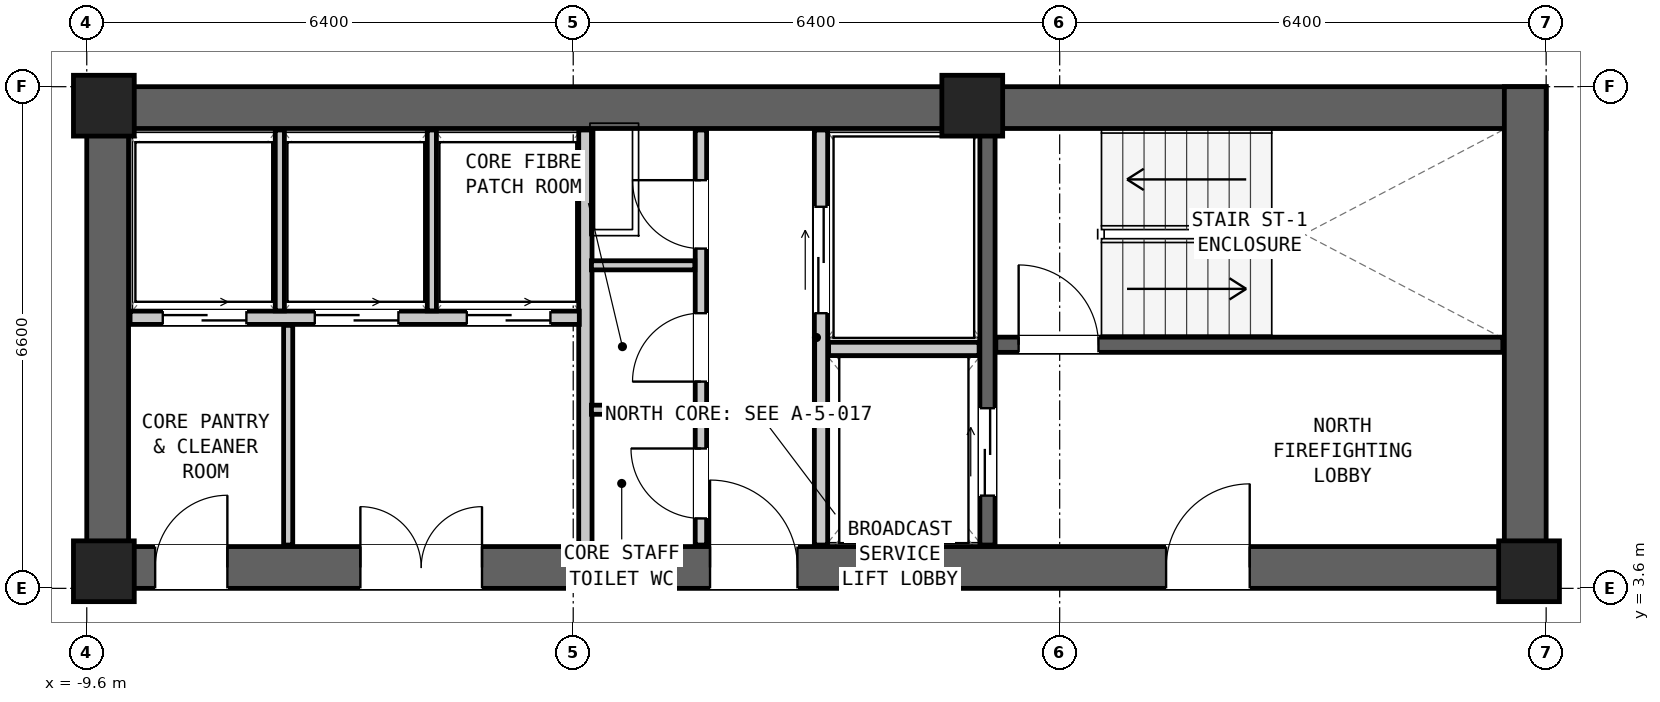
"""IFC4 building model, lengths in metres.
Left out: names, types, materials, properties, quantities, classifications, styles, units other than length and angle.
Written with IfcOpenShell. Run it as: python <this file> out.ifc"""

import sys

from ifc_helpers import new_model, si_unit, direction, frame, frame_2d, origin, origin_2d, place, context, subcontext, project, spatial, rectangle, extrude, element, fill, save


model = new_model("IFC4")
c1 = context("Model", 3, precision=1e-05, world=origin(), true_north=direction((0.0, 1.0)))
c2 = subcontext(c1, "Body", "Model", "MODEL_VIEW")
j1 = project(units=[si_unit("LENGTHUNIT", "METRE"), si_unit("PLANEANGLEUNIT", "RADIAN")], contexts=[c1])
p1 = place(None, origin())
s1 = spatial("IfcSite", under=j1, at=p1, CompositionType="ELEMENT")
p2 = place(p1, origin())
s2 = spatial("IfcBuilding", under=s1, at=p2, CompositionType="ELEMENT")
p3 = place(p2, frame((0.0, 0.0, 50.5)))
s3 = spatial("IfcBuildingStorey", under=s2, at=p3, CompositionType="ELEMENT", Elevation=50.5)
p4 = place(p3, frame((-9.6, 9.925, 0.0), z_axis=(0.0, 0.0, 1.0), x_axis=(1.0, 0.0, 0.0)))
e1 = element("IfcWall", 1, at=p4, inside=s3, PredefinedType="SHEAR", context=c2, shape_type="SweptSolid", body=[
    extrude(rectangle(XDim=19.2, YDim=0.55, at=frame_2d((9.6, 0.0))), origin(), (0.0, 0.0, 1.0), 3.05),
])
p5 = place(p3, frame((-9.6, 3.875, 0.0), z_axis=(0.0, 0.0, 1.0), x_axis=(1.0, 0.0, 0.0)))
e2 = element("IfcWall", 2, at=p5, inside=s3, PredefinedType="SHEAR", context=c2, shape_type="SweptSolid", body=[
    extrude(rectangle(XDim=19.2, YDim=0.55, at=frame_2d((9.6, 0.0))), origin(), (0.0, 0.0, 1.0), 3.05),
])
p6 = place(p5, frame((14.2, 0.0, 0.0)))
e3 = element("IfcOpeningElement", 3, at=p6, cuts=e2, PredefinedType="OPENING", context=c2, shape_type="SweptSolid", body=[
    extrude(rectangle(XDim=1.1, YDim=2.08, at=frame_2d((0.55, 1.04))), frame((0.0, 0.287, 0.0), z_axis=(0.0, -1.0, 0.0), x_axis=(1.0, 0.0, 0.0)), (0.0, 0.0, 1.0), 0.574),
])
p7 = place(p5, frame((8.2, 0.0, 0.0)))
e4 = element("IfcOpeningElement", 4, at=p7, cuts=e2, PredefinedType="OPENING", context=c2, shape_type="SweptSolid", body=[
    extrude(rectangle(XDim=1.15, YDim=2.1, at=frame_2d((0.575, 1.05))), frame((0.0, 0.287, 0.0), z_axis=(0.0, -1.0, 0.0), x_axis=(1.0, 0.0, 0.0)), (0.0, 0.0, 1.0), 0.574),
])
p8 = place(p5, frame((0.9, 0.0, 0.0)))
e5 = element("IfcOpeningElement", 5, at=p8, cuts=e2, PredefinedType="OPENING", context=c2, shape_type="SweptSolid", body=[
    extrude(rectangle(XDim=0.95, YDim=2.1, at=frame_2d((0.475, 1.05))), frame((0.0, 0.287, 0.0), z_axis=(0.0, -1.0, 0.0), x_axis=(1.0, 0.0, 0.0)), (0.0, 0.0, 1.0), 0.574),
])
p9 = place(p5, frame((3.6, 0.0, 0.0)))
e6 = element("IfcOpeningElement", 6, at=p9, cuts=e2, PredefinedType="OPENING", context=c2, shape_type="SweptSolid", body=[
    extrude(rectangle(XDim=1.6, YDim=2.12, at=frame_2d((0.8, 1.06))), frame((0.0, 0.287, 0.0), z_axis=(0.0, -1.0, 0.0), x_axis=(1.0, 0.0, 0.0)), (0.0, 0.0, 1.0), 0.574),
])
for number, where, z_axis, x_axis in (
    (7, (-9.325, 3.6, 0.0), (0.0, 0.0, 1.0), (0.0, 1.0, 0.0)),
    (8, (9.325, 3.6, 0.0), (0.0, 0.0, 1.0), (0.0, 1.0, 0.0)),
):
    element("IfcWall", number, at=place(p3, frame(where, z_axis=z_axis, x_axis=x_axis)), inside=s3, PredefinedType="SHEAR", context=c2, shape_type="SweptSolid", body=[
        extrude(rectangle(XDim=6.6, YDim=0.55, at=frame_2d((3.3, 0.0))), origin(), (0.0, 0.0, 1.0), 3.05),
    ])
for number, where, z_axis, x_axis in (
    (9, (-9.375, 9.95, 0.0), (0.0, 0.0, 1.0), (1.0, 0.0, 0.0)),
    (10, (2.05, 9.95, 0.0), (0.0, 0.0, 1.0), (1.0, 0.0, 0.0)),
    (11, (-9.375, 3.825, 0.0), (0.0, 0.0, 1.0), (1.0, 0.0, 0.0)),
    (12, (9.375, 3.825, 0.0), (0.0, 0.0, 1.0), (1.0, 0.0, 0.0)),
):
    element("IfcColumn", number, at=place(p3, frame(where, z_axis=z_axis, x_axis=x_axis)), inside=s3, PredefinedType="COLUMN", context=c2, shape_type="SweptSolid", body=[
        extrude(rectangle(XDim=0.8, YDim=0.8, at=origin_2d()), origin(), (0.0, 0.0, 1.0), 3.05),
    ])
p10 = place(p3, frame((2.36, 6.805, 0.0), z_axis=(0.0, 0.0, 1.0), x_axis=(1.0, 0.0, 0.0)))
e13 = element("IfcWall", 13, at=p10, inside=s3, PredefinedType="SHEAR", context=c2, shape_type="SweptSolid", body=[
    extrude(rectangle(XDim=6.67, YDim=0.2, at=frame_2d((3.335, 0.0))), origin(), (0.0, 0.0, 1.0), 2.83),
])
p11 = place(p10, frame((0.3, 0.0, 0.0)))
e14 = element("IfcOpeningElement", 14, at=p11, cuts=e13, PredefinedType="OPENING", context=c2, shape_type="SweptSolid", body=[
    extrude(rectangle(XDim=1.05, YDim=2.08, at=frame_2d((0.525, 1.04))), frame((0.0, 0.112, 0.0), z_axis=(0.0, -1.0, 0.0), x_axis=(1.0, 0.0, 0.0)), (0.0, 0.0, 1.0), 0.224),
])
p12 = place(p3, frame((2.25, 4.17, 0.0), z_axis=(0.0, 0.0, 1.0), x_axis=(0.0, 1.0, 0.0)))
e15 = element("IfcWall", 15, at=p12, inside=s3, PredefinedType="SHEAR", context=c2, shape_type="SweptSolid", body=[
    extrude(rectangle(XDim=5.46, YDim=0.2, at=frame_2d((2.73, 0.0))), origin(), (0.0, 0.0, 1.0), 2.83),
])
p13 = place(p12, frame((0.65, 0.0, 0.0)))
e16 = element("IfcOpeningElement", 16, at=p13, cuts=e15, PredefinedType="OPENING", context=c2, shape_type="SweptSolid", body=[
    extrude(rectangle(XDim=1.15, YDim=2.08, at=frame_2d((0.575, 1.04))), frame((0.0, 0.112, 0.0), z_axis=(0.0, -1.0, 0.0), x_axis=(1.0, 0.0, 0.0)), (0.0, 0.0, 1.0), 0.224),
])
p14 = place(p3, frame((0.06, 4.17, 0.0), z_axis=(0.0, 0.0, 1.0), x_axis=(0.0, 1.0, 0.0)))
e17 = element("IfcWall", 17, at=p14, inside=s3, PredefinedType="PARTITIONING", context=c2, shape_type="SweptSolid", body=[
    extrude(rectangle(XDim=5.46, YDim=0.175, at=frame_2d((2.73, 0.0))), origin(), (0.0, 0.0, 1.0), 2.83),
])
p15 = place(p14, frame((3.05, 0.0, 0.0)))
e18 = element("IfcOpeningElement", 18, at=p15, cuts=e17, PredefinedType="OPENING", context=c2, shape_type="SweptSolid", body=[
    extrude(rectangle(XDim=1.4, YDim=2.12, at=frame_2d((0.7, 1.06))), frame((0.0, 0.1, 0.0), z_axis=(0.0, -1.0, 0.0), x_axis=(1.0, 0.0, 0.0)), (0.0, 0.0, 1.0), 0.199),
])
p16 = place(p3, frame((0.16, 6.75, 0.0), z_axis=(0.0, 0.0, 1.0), x_axis=(1.0, 0.0, 0.0)))
e19 = element("IfcWall", 19, at=p16, inside=s3, PredefinedType="PARTITIONING", context=c2, shape_type="SweptSolid", body=[
    extrude(rectangle(XDim=1.98, YDim=0.175, at=frame_2d((0.99, 0.0))), origin(), (0.0, 0.0, 1.0), 2.83),
])
p17 = place(p3, frame((-3.04, 4.17, 0.0), z_axis=(0.0, 0.0, 1.0), x_axis=(0.0, 1.0, 0.0)))
e20 = element("IfcWall", 20, at=p17, inside=s3, PredefinedType="PARTITIONING", context=c2, shape_type="SweptSolid", body=[
    extrude(rectangle(XDim=5.46, YDim=0.175, at=frame_2d((2.73, 0.0))), origin(), (0.0, 0.0, 1.0), 2.83),
])
p18 = place(p3, frame((-1.52, 4.17, 0.0), z_axis=(0.0, 0.0, 1.0), x_axis=(0.0, 1.0, 0.0)))
e21 = element("IfcWall", 21, at=p18, inside=s3, PredefinedType="PARTITIONING", context=c2, shape_type="SweptSolid", body=[
    extrude(rectangle(XDim=5.46, YDim=0.15, at=frame_2d((2.73, 0.0))), origin(), (0.0, 0.0, 1.0), 2.83),
])
p19 = place(p18, frame((3.9, 0.0, 0.0)))
e22 = element("IfcOpeningElement", 22, at=p19, cuts=e21, PredefinedType="OPENING", context=c2, shape_type="SweptSolid", body=[
    extrude(rectangle(XDim=0.9, YDim=2.05, at=frame_2d((0.45, 1.025))), frame((0.0, 0.087, 0.0), z_axis=(0.0, -1.0, 0.0), x_axis=(1.0, 0.0, 0.0)), (0.0, 0.0, 1.0), 0.174),
])
p20 = place(p18, frame((2.15, 0.0, 0.0)))
e23 = element("IfcOpeningElement", 23, at=p20, cuts=e21, PredefinedType="OPENING", context=c2, shape_type="SweptSolid", body=[
    extrude(rectangle(XDim=0.9, YDim=2.05, at=frame_2d((0.45, 1.025))), frame((0.0, 0.087, 0.0), z_axis=(0.0, -1.0, 0.0), x_axis=(1.0, 0.0, 0.0)), (0.0, 0.0, 1.0), 0.174),
])
p21 = place(p18, frame((0.35, 0.0, 0.0)))
e24 = element("IfcOpeningElement", 24, at=p21, cuts=e21, PredefinedType="OPENING", context=c2, shape_type="SweptSolid", body=[
    extrude(rectangle(XDim=0.92, YDim=2.1, at=frame_2d((0.46, 1.05))), frame((0.0, 0.087, 0.0), z_axis=(0.0, -1.0, 0.0), x_axis=(1.0, 0.0, 0.0)), (0.0, 0.0, 1.0), 0.174),
])
for number, where, z_axis, x_axis in (
    (25, (-2.96, 5.95, 0.0), (0.0, 0.0, 1.0), (1.0, 0.0, 0.0)),
    (26, (-2.96, 7.85, 0.0), (0.0, 0.0, 1.0), (1.0, 0.0, 0.0)),
):
    element("IfcWall", number, at=place(p3, frame(where, z_axis=z_axis, x_axis=x_axis)), inside=s3, PredefinedType="PARTITIONING", context=c2, shape_type="SweptSolid", body=[
        extrude(rectangle(XDim=1.36, YDim=0.12, at=frame_2d((0.68, 0.0))), origin(), (0.0, 0.0, 1.0), 2.83),
    ])
p22 = place(p3, frame((-9.03, 7.16, 0.0), z_axis=(0.0, 0.0, 1.0), x_axis=(1.0, 0.0, 0.0)))
e27 = element("IfcWall", 27, at=p22, inside=s3, PredefinedType="PARTITIONING", context=c2, shape_type="SweptSolid", body=[
    extrude(rectangle(XDim=5.91, YDim=0.175, at=frame_2d((2.955, 0.0))), origin(), (0.0, 0.0, 1.0), 2.83),
])
p23 = place(p22, frame((0.43, 0.0, 0.0)))
e28 = element("IfcOpeningElement", 28, at=p23, cuts=e27, PredefinedType="OPENING", context=c2, shape_type="SweptSolid", body=[
    extrude(rectangle(XDim=1.1, YDim=2.06, at=frame_2d((0.55, 1.03))), frame((0.0, 0.1, 0.0), z_axis=(0.0, -1.0, 0.0), x_axis=(1.0, 0.0, 0.0)), (0.0, 0.0, 1.0), 0.199),
])
p24 = place(p22, frame((2.43, 0.0, 0.0)))
e29 = element("IfcOpeningElement", 29, at=p24, cuts=e27, PredefinedType="OPENING", context=c2, shape_type="SweptSolid", body=[
    extrude(rectangle(XDim=1.1, YDim=2.06, at=frame_2d((0.55, 1.03))), frame((0.0, 0.1, 0.0), z_axis=(0.0, -1.0, 0.0), x_axis=(1.0, 0.0, 0.0)), (0.0, 0.0, 1.0), 0.199),
])
p25 = place(p22, frame((4.43, 0.0, 0.0)))
e30 = element("IfcOpeningElement", 30, at=p25, cuts=e27, PredefinedType="OPENING", context=c2, shape_type="SweptSolid", body=[
    extrude(rectangle(XDim=1.1, YDim=2.06, at=frame_2d((0.55, 1.03))), frame((0.0, 0.1, 0.0), z_axis=(0.0, -1.0, 0.0), x_axis=(1.0, 0.0, 0.0)), (0.0, 0.0, 1.0), 0.199),
])
for number, where, z_axis, x_axis in (
    (31, (-7.06, 7.25, 0.0), (0.0, 0.0, 1.0), (0.0, 1.0, 0.0)),
    (32, (-5.06, 7.25, 0.0), (0.0, 0.0, 1.0), (0.0, 1.0, 0.0)),
):
    element("IfcWall", number, at=place(p3, frame(where, z_axis=z_axis, x_axis=x_axis)), inside=s3, PredefinedType="PARTITIONING", context=c2, shape_type="SweptSolid", body=[
        extrude(rectangle(XDim=2.38, YDim=0.12, at=frame_2d((1.19, 0.0))), origin(), (0.0, 0.0, 1.0), 2.83),
    ])
p26 = place(p3, frame((-6.95, 4.17, 0.0), z_axis=(0.0, 0.0, 1.0), x_axis=(0.0, 1.0, 0.0)))
e33 = element("IfcWall", 33, at=p26, inside=s3, PredefinedType="PARTITIONING", context=c2, shape_type="SweptSolid", body=[
    extrude(rectangle(XDim=2.89, YDim=0.12, at=frame_2d((1.445, 0.0))), origin(), (0.0, 0.0, 1.0), 2.83),
])
p27 = place(p11, origin())
e34 = element("IfcDoor", 34, at=p27, inside=s3, OperationType="SINGLE_SWING_LEFT", PredefinedType="DOOR", context=c2, shape_type="SweptSolid", body=[
    extrude(rectangle(XDim=1.05, YDim=2.08, at=frame_2d((0.525, 1.04))), frame((0.0, 0.025, 0.0), z_axis=(0.0, -1.0, 0.0), x_axis=(1.0, 0.0, 0.0)), (0.0, 0.0, 1.0), 0.05),
])
fill(e14, e34)
p28 = place(p6, origin())
e35 = element("IfcDoor", 35, at=p28, inside=s3, OperationType="SINGLE_SWING_RIGHT", PredefinedType="DOOR", context=c2, shape_type="SweptSolid", body=[
    extrude(rectangle(XDim=1.1, YDim=2.08, at=frame_2d((0.55, 1.04))), frame((0.0, 0.025, 0.0), z_axis=(0.0, -1.0, 0.0), x_axis=(1.0, 0.0, 0.0)), (0.0, 0.0, 1.0), 0.05),
])
fill(e3, e35)
p29 = place(p13, origin())
e36 = element("IfcDoor", 36, at=p29, inside=s3, OperationType="DOUBLE_DOOR_SLIDING", PredefinedType="DOOR", context=c2, shape_type="SweptSolid", body=[
    extrude(rectangle(XDim=1.15, YDim=2.08, at=frame_2d((0.575, 1.04))), frame((0.0, 0.025, 0.0), z_axis=(0.0, -1.0, 0.0), x_axis=(1.0, 0.0, 0.0)), (0.0, 0.0, 1.0), 0.05),
])
fill(e16, e36)
p30 = place(p15, origin())
e37 = element("IfcDoor", 37, at=p30, inside=s3, OperationType="DOUBLE_DOOR_SLIDING", PredefinedType="DOOR", context=c2, shape_type="SweptSolid", body=[
    extrude(rectangle(XDim=1.4, YDim=2.12, at=frame_2d((0.7, 1.06))), frame((0.0, 0.025, 0.0), z_axis=(0.0, -1.0, 0.0), x_axis=(1.0, 0.0, 0.0)), (0.0, 0.0, 1.0), 0.05),
])
fill(e18, e37)
p31 = place(p7, origin())
e38 = element("IfcDoor", 38, at=p31, inside=s3, OperationType="SINGLE_SWING_LEFT", PredefinedType="DOOR", context=c2, shape_type="SweptSolid", body=[
    extrude(rectangle(XDim=1.15, YDim=2.1, at=frame_2d((0.575, 1.05))), frame((0.0, 0.025, 0.0), z_axis=(0.0, -1.0, 0.0), x_axis=(1.0, 0.0, 0.0)), (0.0, 0.0, 1.0), 0.05),
])
fill(e4, e38)
p32 = place(p19, origin())
e39 = element("IfcDoor", 39, at=p32, inside=s3, OperationType="SINGLE_SWING_RIGHT", PredefinedType="DOOR", context=c2, shape_type="SweptSolid", body=[
    extrude(rectangle(XDim=0.9, YDim=2.05, at=frame_2d((0.45, 1.025))), frame((0.0, 0.025, 0.0), z_axis=(0.0, -1.0, 0.0), x_axis=(1.0, 0.0, 0.0)), (0.0, 0.0, 1.0), 0.05),
])
fill(e22, e39)
p33 = place(p20, origin())
e40 = element("IfcDoor", 40, at=p33, inside=s3, OperationType="SINGLE_SWING_LEFT", PredefinedType="DOOR", context=c2, shape_type="SweptSolid", body=[
    extrude(rectangle(XDim=0.9, YDim=2.05, at=frame_2d((0.45, 1.025))), frame((0.0, 0.025, 0.0), z_axis=(0.0, -1.0, 0.0), x_axis=(1.0, 0.0, 0.0)), (0.0, 0.0, 1.0), 0.05),
])
fill(e23, e40)
p34 = place(p21, origin())
e41 = element("IfcDoor", 41, at=p34, inside=s3, OperationType="SINGLE_SWING_RIGHT", PredefinedType="DOOR", context=c2, shape_type="SweptSolid", body=[
    extrude(rectangle(XDim=0.92, YDim=2.1, at=frame_2d((0.46, 1.05))), frame((0.0, 0.025, 0.0), z_axis=(0.0, -1.0, 0.0), x_axis=(1.0, 0.0, 0.0)), (0.0, 0.0, 1.0), 0.05),
])
fill(e24, e41)
p35 = place(p23, origin())
e42 = element("IfcDoor", 42, at=p35, inside=s3, OperationType="DOUBLE_DOOR_SLIDING", PredefinedType="DOOR", context=c2, shape_type="SweptSolid", body=[
    extrude(rectangle(XDim=1.1, YDim=2.06, at=frame_2d((0.55, 1.03))), frame((0.0, 0.025, 0.0), z_axis=(0.0, -1.0, 0.0), x_axis=(1.0, 0.0, 0.0)), (0.0, 0.0, 1.0), 0.05),
])
fill(e28, e42)
p36 = place(p24, origin())
e43 = element("IfcDoor", 43, at=p36, inside=s3, OperationType="DOUBLE_DOOR_SLIDING", PredefinedType="DOOR", context=c2, shape_type="SweptSolid", body=[
    extrude(rectangle(XDim=1.1, YDim=2.06, at=frame_2d((0.55, 1.03))), frame((0.0, 0.025, 0.0), z_axis=(0.0, -1.0, 0.0), x_axis=(1.0, 0.0, 0.0)), (0.0, 0.0, 1.0), 0.05),
])
fill(e29, e43)
p37 = place(p25, origin())
e44 = element("IfcDoor", 44, at=p37, inside=s3, OperationType="DOUBLE_DOOR_SLIDING", PredefinedType="DOOR", context=c2, shape_type="SweptSolid", body=[
    extrude(rectangle(XDim=1.1, YDim=2.06, at=frame_2d((0.55, 1.03))), frame((0.0, 0.025, 0.0), z_axis=(0.0, -1.0, 0.0), x_axis=(1.0, 0.0, 0.0)), (0.0, 0.0, 1.0), 0.05),
])
fill(e30, e44)
p38 = place(p8, origin())
e45 = element("IfcDoor", 45, at=p38, inside=s3, OperationType="SINGLE_SWING_RIGHT", PredefinedType="DOOR", context=c2, shape_type="SweptSolid", body=[
    extrude(rectangle(XDim=0.95, YDim=2.1, at=frame_2d((0.475, 1.05))), frame((0.0, 0.025, 0.0), z_axis=(0.0, -1.0, 0.0), x_axis=(1.0, 0.0, 0.0)), (0.0, 0.0, 1.0), 0.05),
])
fill(e5, e45)
p39 = place(p9, origin())
e46 = element("IfcDoor", 46, at=p39, inside=s3, OperationType="DOUBLE_DOOR_SINGLE_SWING", PredefinedType="DOOR", context=c2, shape_type="SweptSolid", body=[
    extrude(rectangle(XDim=1.6, YDim=2.12, at=frame_2d((0.8, 1.06))), frame((0.0, 0.025, 0.0), z_axis=(0.0, -1.0, 0.0), x_axis=(1.0, 0.0, 0.0)), (0.0, 0.0, 1.0), 0.05),
])
fill(e6, e46)
save(model, sys.argv[1])
